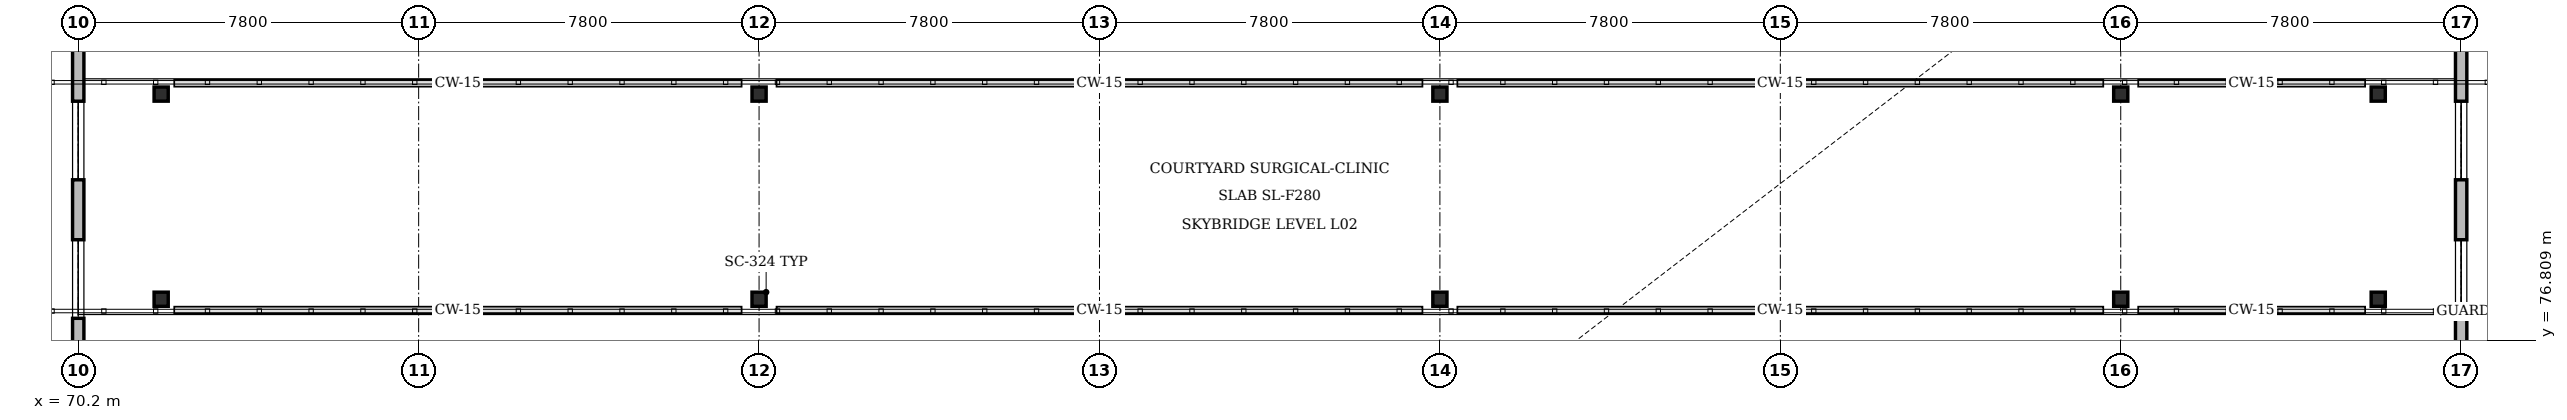
"""IFC4 building model, lengths in metres.
Left out: names, types, materials, properties, quantities, classifications, styles, units other than length and angle.
Written with IfcOpenShell. Run it as: python <this file> out.ifc"""

import sys

from ifc_helpers import new_model, si_unit, direction, frame, frame_2d, origin, origin_2d, place, context, subcontext, project, spatial, rectangle, hollow_circle, extrude, element, fill, save


model = new_model("IFC4")
c1 = context("Model", 3, precision=1e-05, world=origin(), true_north=direction((0.0, 1.0)))
c2 = subcontext(c1, "Body", "Model", "MODEL_VIEW")
j1 = project(units=[si_unit("LENGTHUNIT", "METRE"), si_unit("PLANEANGLEUNIT", "RADIAN")], contexts=[c1])
p1 = place(None, origin())
s1 = spatial("IfcSite", under=j1, at=p1, CompositionType="ELEMENT")
p2 = place(p1, origin())
s2 = spatial("IfcBuilding", under=s1, at=p2, CompositionType="ELEMENT")
p3 = place(p2, frame((0.0, 0.0, 9.6)))
s3 = spatial("IfcBuildingStorey", under=s2, at=p3, CompositionType="ELEMENT", Elevation=9.6)
for number, where, z_axis, x_axis in (
    (1, (85.8, 77.75, 0.0), (0.0, 0.0, 1.0), (1.0, 0.0, 0.0)),
    (2, (85.8, 82.45, 0.0), (0.0, 0.0, 1.0), (1.0, 0.0, 0.0)),
    (3, (101.4, 77.75, 0.0), (0.0, 0.0, 1.0), (1.0, 0.0, 0.0)),
    (4, (101.4, 82.45, 0.0), (0.0, 0.0, 1.0), (1.0, 0.0, 0.0)),
    (5, (117.0, 77.75, 0.0), (0.0, 0.0, 1.0), (1.0, 0.0, 0.0)),
    (6, (117.0, 82.45, 0.0), (0.0, 0.0, 1.0), (1.0, 0.0, 0.0)),
    (7, (72.1, 77.75, 0.0), (0.0, 0.0, 1.0), (1.0, 0.0, 0.0)),
    (8, (72.1, 82.45, 0.0), (0.0, 0.0, 1.0), (1.0, 0.0, 0.0)),
    (9, (122.9, 77.75, 0.0), (0.0, 0.0, 1.0), (1.0, 0.0, 0.0)),
    (10, (122.9, 82.45, 0.0), (0.0, 0.0, 1.0), (1.0, 0.0, 0.0)),
):
    element("IfcColumn", number, at=place(p3, frame(where, z_axis=z_axis, x_axis=x_axis)), inside=s3, PredefinedType="COLUMN", context=c2, shape_type="SweptSolid", body=[
        extrude(hollow_circle(Radius=0.162, WallThickness=0.012, at=origin_2d()), origin(), (0.0, 0.0, 1.0), 3.64),
    ])
p4 = place(p3, frame((70.2, 75.94, 0.0), z_axis=(0.0, 0.0, 1.0), x_axis=(0.0, 1.0, 0.0)))
e11 = element("IfcWall", 11, at=p4, inside=s3, PredefinedType="STANDARD", context=c2, shape_type="SweptSolid", body=[
    extrude(rectangle(XDim=7.72, YDim=0.26, at=frame_2d((3.86, 0.0))), origin(), (0.0, 0.0, 1.0), 3.715),
])
p5 = place(p4, frame((1.373, 0.0, 0.9)))
e12 = element("IfcOpeningElement", 12, at=p5, cuts=e11, PredefinedType="OPENING", context=c2, shape_type="SweptSolid", body=[
    extrude(rectangle(XDim=1.8, YDim=1.65, at=frame_2d((0.9, 0.825))), frame((0.0, 0.14, 0.0), z_axis=(0.0, -1.0, 0.0), x_axis=(1.0, 0.0, 0.0)), (0.0, 0.0, 1.0), 0.28),
])
p6 = place(p4, frame((4.547, 0.0, 0.9)))
e13 = element("IfcOpeningElement", 13, at=p6, cuts=e11, PredefinedType="OPENING", context=c2, shape_type="SweptSolid", body=[
    extrude(rectangle(XDim=1.8, YDim=1.65, at=frame_2d((0.9, 0.825))), frame((0.0, 0.14, 0.0), z_axis=(0.0, -1.0, 0.0), x_axis=(1.0, 0.0, 0.0)), (0.0, 0.0, 1.0), 0.28),
])
p7 = place(p3, frame((124.8, 83.66, 0.0), z_axis=(0.0, 0.0, 1.0), x_axis=(0.0, -1.0, 0.0)))
e14 = element("IfcWall", 14, at=p7, inside=s3, PredefinedType="STANDARD", context=c2, shape_type="SweptSolid", body=[
    extrude(rectangle(XDim=7.72, YDim=0.26, at=frame_2d((3.86, 0.0))), origin(), (0.0, 0.0, 1.0), 3.715),
])
p8 = place(p7, frame((1.373, 0.0, 0.9)))
e15 = element("IfcOpeningElement", 15, at=p8, cuts=e14, PredefinedType="OPENING", context=c2, shape_type="SweptSolid", body=[
    extrude(rectangle(XDim=1.8, YDim=1.65, at=frame_2d((0.9, 0.825))), frame((0.0, 0.14, 0.0), z_axis=(0.0, -1.0, 0.0), x_axis=(1.0, 0.0, 0.0)), (0.0, 0.0, 1.0), 0.28),
])
p9 = place(p7, frame((4.547, 0.0, 0.9)))
e16 = element("IfcOpeningElement", 16, at=p9, cuts=e14, PredefinedType="OPENING", context=c2, shape_type="SweptSolid", body=[
    extrude(rectangle(XDim=1.8, YDim=1.65, at=frame_2d((0.9, 0.825))), frame((0.0, 0.14, 0.0), z_axis=(0.0, -1.0, 0.0), x_axis=(1.0, 0.0, 0.0)), (0.0, 0.0, 1.0), 0.28),
])
p10 = place(p5, origin())
e17 = element("IfcWindow", 17, at=p10, inside=s3, PartitioningType="SINGLE_PANEL", PredefinedType="WINDOW", context=c2, shape_type="SweptSolid", body=[
    extrude(rectangle(XDim=1.8, YDim=1.65, at=frame_2d((0.9, 0.825))), frame((0.0, 0.03, 0.0), z_axis=(0.0, -1.0, 0.0), x_axis=(1.0, 0.0, 0.0)), (0.0, 0.0, 1.0), 0.06),
])
fill(e12, e17)
p11 = place(p6, origin())
e18 = element("IfcWindow", 18, at=p11, inside=s3, PartitioningType="SINGLE_PANEL", PredefinedType="WINDOW", context=c2, shape_type="SweptSolid", body=[
    extrude(rectangle(XDim=1.8, YDim=1.65, at=frame_2d((0.9, 0.825))), frame((0.0, 0.03, 0.0), z_axis=(0.0, -1.0, 0.0), x_axis=(1.0, 0.0, 0.0)), (0.0, 0.0, 1.0), 0.06),
])
fill(e13, e18)
p12 = place(p8, origin())
e19 = element("IfcWindow", 19, at=p12, inside=s3, PartitioningType="SINGLE_PANEL", PredefinedType="WINDOW", context=c2, shape_type="SweptSolid", body=[
    extrude(rectangle(XDim=1.8, YDim=1.65, at=frame_2d((0.9, 0.825))), frame((0.0, 0.03, 0.0), z_axis=(0.0, -1.0, 0.0), x_axis=(1.0, 0.0, 0.0)), (0.0, 0.0, 1.0), 0.06),
])
fill(e15, e19)
p13 = place(p9, origin())
e20 = element("IfcWindow", 20, at=p13, inside=s3, PartitioningType="SINGLE_PANEL", PredefinedType="WINDOW", context=c2, shape_type="SweptSolid", body=[
    extrude(rectangle(XDim=1.8, YDim=1.65, at=frame_2d((0.9, 0.825))), frame((0.0, 0.03, 0.0), z_axis=(0.0, -1.0, 0.0), x_axis=(1.0, 0.0, 0.0)), (0.0, 0.0, 1.0), 0.06),
])
fill(e16, e20)
save(model, sys.argv[1])
